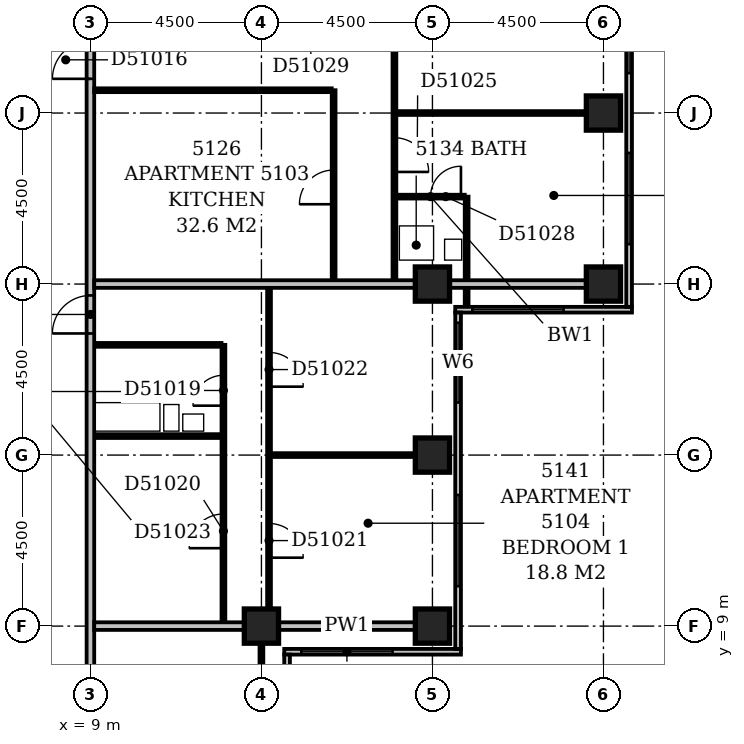
"""IFC4 building model, lengths in metres.
Left out: names, types, materials, properties, quantities, classifications, styles, units other than length and angle.
Written with IfcOpenShell. Run it as: python <this file> out.ifc"""

import sys

from ifc_helpers import new_model, si_unit, direction, frame, frame_2d, origin, origin_2d, place, context, subcontext, project, spatial, rectangle, extrude, element, fill, save


model = new_model("IFC4")
c1 = context("Model", 3, precision=1e-05, world=origin(), true_north=direction((0.0, 1.0)))
c2 = subcontext(c1, "Body", "Model", "MODEL_VIEW")
j1 = project(units=[si_unit("LENGTHUNIT", "METRE"), si_unit("PLANEANGLEUNIT", "RADIAN")], contexts=[c1])
p1 = place(None, origin())
s1 = spatial("IfcSite", under=j1, at=p1, CompositionType="ELEMENT")
p2 = place(p1, origin())
s2 = spatial("IfcBuilding", under=s1, at=p2, CompositionType="ELEMENT")
p3 = place(p2, frame((0.0, 0.0, 200.6)))
s3 = spatial("IfcBuildingStorey", under=s2, at=p3, CompositionType="ELEMENT", Elevation=200.6)
for number, where, z_axis, x_axis in (
    (1, (13.5, 9.0, -0.3), (0.0, 0.0, 1.0), (1.0, 0.0, 0.0)),
    (2, (18.0, 9.0, -0.3), (0.0, 0.0, 1.0), (1.0, 0.0, 0.0)),
    (3, (18.0, 13.5, -0.3), (0.0, 0.0, 1.0), (1.0, 0.0, 0.0)),
    (4, (18.0, 18.0, -0.3), (0.0, 0.0, 1.0), (1.0, 0.0, 0.0)),
    (5, (22.5, 18.0, -0.3), (0.0, 0.0, 1.0), (1.0, 0.0, 0.0)),
    (6, (22.5, 22.5, -0.3), (0.0, 0.0, 1.0), (1.0, 0.0, 0.0)),
):
    element("IfcColumn", number, at=place(p3, frame(where, z_axis=z_axis, x_axis=x_axis)), inside=s3, PredefinedType="COLUMN", context=c2, shape_type="SweptSolid", body=[
        extrude(rectangle(XDim=0.9, YDim=0.9, at=origin_2d()), origin(), (0.0, 0.0, 1.0), 3.6),
    ])
p4 = place(p3, frame((14.175, 3.9, 0.0), z_axis=(0.0, 0.0, 1.0), x_axis=(0.0, 1.0, 0.0)))
e7 = element("IfcWall", 7, at=p4, inside=s3, PredefinedType="STANDARD", context=c2, shape_type="SweptSolid", body=[
    extrude(rectangle(XDim=4.35, YDim=0.15, at=frame_2d((2.175, 0.0))), origin(), (0.0, 0.0, 1.0), 2.7),
])
p5 = place(p4, frame((1.65, 0.0, 0.6)))
e8 = element("IfcOpeningElement", 8, at=p5, cuts=e7, PredefinedType="OPENING", context=c2, shape_type="SweptSolid", body=[
    extrude(rectangle(XDim=2.4, YDim=1.8, at=frame_2d((1.2, 0.9))), frame((0.0, 0.087, 0.0), z_axis=(0.0, -1.0, 0.0), x_axis=(1.0, 0.0, 0.0)), (0.0, 0.0, 1.0), 0.174),
])
p6 = place(p3, frame((14.1, 8.325, 0.0), z_axis=(0.0, 0.0, 1.0), x_axis=(1.0, 0.0, 0.0)))
e9 = element("IfcWall", 9, at=p6, inside=s3, PredefinedType="STANDARD", context=c2, shape_type="SweptSolid", body=[
    extrude(rectangle(XDim=4.65, YDim=0.15, at=frame_2d((2.325, 0.0))), origin(), (0.0, 0.0, 1.0), 2.7),
])
p7 = place(p6, frame((0.45, 0.0, 0.6)))
e10 = element("IfcOpeningElement", 10, at=p7, cuts=e9, PredefinedType="OPENING", context=c2, shape_type="SweptSolid", body=[
    extrude(rectangle(XDim=2.4, YDim=1.8, at=frame_2d((1.2, 0.9))), frame((0.0, 0.087, 0.0), z_axis=(0.0, -1.0, 0.0), x_axis=(1.0, 0.0, 0.0)), (0.0, 0.0, 1.0), 0.174),
])
p8 = place(p3, frame((18.675, 8.4, 0.0), z_axis=(0.0, 0.0, 1.0), x_axis=(0.0, 1.0, 0.0)))
e11 = element("IfcWall", 11, at=p8, inside=s3, PredefinedType="STANDARD", context=c2, shape_type="SweptSolid", body=[
    extrude(rectangle(XDim=8.85, YDim=0.15, at=frame_2d((4.425, 0.0))), origin(), (0.0, 0.0, 1.0), 2.7),
])
p9 = place(p8, frame((1.65, 0.0, 0.6)))
e12 = element("IfcOpeningElement", 12, at=p9, cuts=e11, PredefinedType="OPENING", context=c2, shape_type="SweptSolid", body=[
    extrude(rectangle(XDim=2.4, YDim=1.8, at=frame_2d((1.2, 0.9))), frame((0.0, 0.087, 0.0), z_axis=(0.0, -1.0, 0.0), x_axis=(1.0, 0.0, 0.0)), (0.0, 0.0, 1.0), 0.174),
])
p10 = place(p8, frame((6.483, 0.0, 0.6)))
e13 = element("IfcOpeningElement", 13, at=p10, cuts=e11, PredefinedType="OPENING", context=c2, shape_type="SweptSolid", body=[
    extrude(rectangle(XDim=2.1, YDim=1.8, at=frame_2d((1.05, 0.9))), frame((0.0, 0.087, 0.0), z_axis=(0.0, -1.0, 0.0), x_axis=(1.0, 0.0, 0.0)), (0.0, 0.0, 1.0), 0.174),
])
p11 = place(p3, frame((18.6, 17.325, 0.0), z_axis=(0.0, 0.0, 1.0), x_axis=(1.0, 0.0, 0.0)))
e14 = element("IfcWall", 14, at=p11, inside=s3, PredefinedType="STANDARD", context=c2, shape_type="SweptSolid", body=[
    extrude(rectangle(XDim=4.65, YDim=0.15, at=frame_2d((2.325, 0.0))), origin(), (0.0, 0.0, 1.0), 2.7),
])
p12 = place(p11, frame((0.45, 0.0, 0.6)))
e15 = element("IfcOpeningElement", 15, at=p12, cuts=e14, PredefinedType="OPENING", context=c2, shape_type="SweptSolid", body=[
    extrude(rectangle(XDim=2.4, YDim=1.8, at=frame_2d((1.2, 0.9))), frame((0.0, 0.087, 0.0), z_axis=(0.0, -1.0, 0.0), x_axis=(1.0, 0.0, 0.0)), (0.0, 0.0, 1.0), 0.174),
])
p13 = place(p3, frame((23.175, 17.4, 0.0), z_axis=(0.0, 0.0, 1.0), x_axis=(0.0, 1.0, 0.0)))
e16 = element("IfcWall", 16, at=p13, inside=s3, PredefinedType="STANDARD", context=c2, shape_type="SweptSolid", body=[
    extrude(rectangle(XDim=17.85, YDim=0.15, at=frame_2d((8.925, 0.0))), origin(), (0.0, 0.0, 1.0), 2.7),
])
p14 = place(p13, frame((1.65, 0.0, 0.6)))
e17 = element("IfcOpeningElement", 17, at=p14, cuts=e16, PredefinedType="OPENING", context=c2, shape_type="SweptSolid", body=[
    extrude(rectangle(XDim=2.4, YDim=1.8, at=frame_2d((1.2, 0.9))), frame((0.0, 0.087, 0.0), z_axis=(0.0, -1.0, 0.0), x_axis=(1.0, 0.0, 0.0)), (0.0, 0.0, 1.0), 0.174),
])
p15 = place(p13, frame((6.15, 0.0, 0.6)))
e18 = element("IfcOpeningElement", 18, at=p15, cuts=e16, PredefinedType="OPENING", context=c2, shape_type="SweptSolid", body=[
    extrude(rectangle(XDim=2.4, YDim=1.8, at=frame_2d((1.2, 0.9))), frame((0.0, 0.087, 0.0), z_axis=(0.0, -1.0, 0.0), x_axis=(1.0, 0.0, 0.0)), (0.0, 0.0, 1.0), 0.174),
])
p16 = place(p13, frame((10.252, 0.0, 0.6)))
e19 = element("IfcOpeningElement", 19, at=p16, cuts=e16, PredefinedType="OPENING", context=c2, shape_type="SweptSolid", body=[
    extrude(rectangle(XDim=0.6, YDim=1.8, at=frame_2d((0.3, 0.9))), frame((0.0, 0.087, 0.0), z_axis=(0.0, -1.0, 0.0), x_axis=(1.0, 0.0, 0.0)), (0.0, 0.0, 1.0), 0.174),
])
p17 = place(p13, frame((12.756, 0.0, 0.6)))
e20 = element("IfcOpeningElement", 20, at=p17, cuts=e16, PredefinedType="OPENING", context=c2, shape_type="SweptSolid", body=[
    extrude(rectangle(XDim=0.6, YDim=1.8, at=frame_2d((0.3, 0.9))), frame((0.0, 0.087, 0.0), z_axis=(0.0, -1.0, 0.0), x_axis=(1.0, 0.0, 0.0)), (0.0, 0.0, 1.0), 0.174),
])
p18 = place(p13, frame((15.15, 0.0, 0.6)))
e21 = element("IfcOpeningElement", 21, at=p18, cuts=e16, PredefinedType="OPENING", context=c2, shape_type="SweptSolid", body=[
    extrude(rectangle(XDim=2.4, YDim=1.8, at=frame_2d((1.2, 0.9))), frame((0.0, 0.087, 0.0), z_axis=(0.0, -1.0, 0.0), x_axis=(1.0, 0.0, 0.0)), (0.0, 0.0, 1.0), 0.174),
])
p19 = place(p3, frame((13.5, 4.95, 0.0), z_axis=(0.0, 0.0, 1.0), x_axis=(0.0, 1.0, 0.0)))
e22 = element("IfcWall", 22, at=p19, inside=s3, PredefinedType="PARTITIONING", context=c2, shape_type="SweptSolid", body=[
    extrude(rectangle(XDim=3.6, YDim=0.1, at=frame_2d((1.8, 0.0))), origin(), (0.0, 0.0, 1.0), 2.7),
])
p20 = place(p3, frame((9.0, 5.0, 0.0), z_axis=(0.0, 0.0, 1.0), x_axis=(0.0, 1.0, 0.0)))
e23 = element("IfcWall", 23, at=p20, inside=s3, PredefinedType="PARTITIONING", context=c2, shape_type="SweptSolid", body=[
    extrude(rectangle(XDim=31.0, YDim=0.2, at=frame_2d((15.5, 0.0))), origin(), (0.0, 0.0, 1.0), 3.3),
])
p21 = place(p20, frame((18.4, 0.0, 0.0)))
e24 = element("IfcOpeningElement", 24, at=p21, cuts=e23, PredefinedType="OPENING", context=c2, shape_type="SweptSolid", body=[
    extrude(rectangle(XDim=1.0, YDim=2.1, at=frame_2d((0.5, 1.05))), frame((0.0, 0.112, 0.0), z_axis=(0.0, -1.0, 0.0), x_axis=(1.0, 0.0, 0.0)), (0.0, 0.0, 1.0), 0.224),
])
p22 = place(p20, frame((11.7, 0.0, 0.0)))
e25 = element("IfcOpeningElement", 25, at=p22, cuts=e23, PredefinedType="OPENING", context=c2, shape_type="SweptSolid", body=[
    extrude(rectangle(XDim=1.0, YDim=2.1, at=frame_2d((0.5, 1.05))), frame((0.0, 0.112, 0.0), z_axis=(0.0, -1.0, 0.0), x_axis=(1.0, 0.0, 0.0)), (0.0, 0.0, 1.0), 0.224),
])
p23 = place(p20, frame((1.5, 0.0, 0.0)))
e26 = element("IfcOpeningElement", 26, at=p23, cuts=e23, PredefinedType="OPENING", context=c2, shape_type="SweptSolid", body=[
    extrude(rectangle(XDim=0.9, YDim=2.1, at=frame_2d((0.45, 1.05))), frame((0.0, 0.112, 0.0), z_axis=(0.0, -1.0, 0.0), x_axis=(1.0, 0.0, 0.0)), (0.0, 0.0, 1.0), 0.224),
])
p24 = place(p3, frame((9.1, 9.0, 0.0), z_axis=(0.0, 0.0, 1.0), x_axis=(1.0, 0.0, 0.0)))
e27 = element("IfcWall", 27, at=p24, inside=s3, PredefinedType="PARTITIONING", context=c2, shape_type="SweptSolid", body=[
    extrude(rectangle(XDim=3.95, YDim=0.2, at=frame_2d((1.975, 0.0))), origin(), (0.0, 0.0, 1.0), 3.3),
])
p25 = place(p3, frame((13.95, 9.0, 0.0), z_axis=(0.0, 0.0, 1.0), x_axis=(1.0, 0.0, 0.0)))
e28 = element("IfcWall", 28, at=p25, inside=s3, PredefinedType="PARTITIONING", context=c2, shape_type="SweptSolid", body=[
    extrude(rectangle(XDim=3.6, YDim=0.2, at=frame_2d((1.8, 0.0))), origin(), (0.0, 0.0, 1.0), 2.7),
])
p26 = place(p3, frame((12.5, 9.1, 0.0), z_axis=(0.0, 0.0, 1.0), x_axis=(0.0, 1.0, 0.0)))
e29 = element("IfcWall", 29, at=p26, inside=s3, PredefinedType="PARTITIONING", context=c2, shape_type="SweptSolid", body=[
    extrude(rectangle(XDim=7.3, YDim=0.1, at=frame_2d((3.65, 0.0))), origin(), (0.0, 0.0, 1.0), 3.3),
])
p27 = place(p26, frame((5.7, 0.0, 0.0)))
e30 = element("IfcOpeningElement", 30, at=p27, cuts=e29, PredefinedType="OPENING", context=c2, shape_type="SweptSolid", body=[
    extrude(rectangle(XDim=0.8, YDim=2.1, at=frame_2d((0.4, 1.05))), frame((0.0, 0.062, 0.0), z_axis=(0.0, -1.0, 0.0), x_axis=(1.0, 0.0, 0.0)), (0.0, 0.0, 1.0), 0.124),
])
p28 = place(p26, frame((1.95, 0.0, 0.0)))
e31 = element("IfcOpeningElement", 31, at=p28, cuts=e29, PredefinedType="OPENING", context=c2, shape_type="SweptSolid", body=[
    extrude(rectangle(XDim=0.9, YDim=2.1, at=frame_2d((0.45, 1.05))), frame((0.0, 0.062, 0.0), z_axis=(0.0, -1.0, 0.0), x_axis=(1.0, 0.0, 0.0)), (0.0, 0.0, 1.0), 0.124),
])
p29 = place(p3, frame((13.7, 9.45, 0.0), z_axis=(0.0, 0.0, 1.0), x_axis=(0.0, 1.0, 0.0)))
e32 = element("IfcWall", 32, at=p29, inside=s3, PredefinedType="PARTITIONING", context=c2, shape_type="SweptSolid", body=[
    extrude(rectangle(XDim=8.45, YDim=0.1, at=frame_2d((4.225, 0.0))), origin(), (0.0, 0.0, 1.0), 3.3),
])
p30 = place(p29, frame((1.35, 0.0, 0.0)))
e33 = element("IfcOpeningElement", 33, at=p30, cuts=e32, PredefinedType="OPENING", context=c2, shape_type="SweptSolid", body=[
    extrude(rectangle(XDim=0.9, YDim=2.1, at=frame_2d((0.45, 1.05))), frame((0.0, 0.062, 0.0), z_axis=(0.0, -1.0, 0.0), x_axis=(1.0, 0.0, 0.0)), (0.0, 0.0, 1.0), 0.124),
])
p31 = place(p29, frame((5.85, 0.0, 0.0)))
e34 = element("IfcOpeningElement", 34, at=p31, cuts=e32, PredefinedType="OPENING", context=c2, shape_type="SweptSolid", body=[
    extrude(rectangle(XDim=0.9, YDim=2.1, at=frame_2d((0.45, 1.05))), frame((0.0, 0.062, 0.0), z_axis=(0.0, -1.0, 0.0), x_axis=(1.0, 0.0, 0.0)), (0.0, 0.0, 1.0), 0.124),
])
p32 = place(p3, frame((13.75, 13.5, 0.0), z_axis=(0.0, 0.0, 1.0), x_axis=(1.0, 0.0, 0.0)))
e35 = element("IfcWall", 35, at=p32, inside=s3, PredefinedType="PARTITIONING", context=c2, shape_type="SweptSolid", body=[
    extrude(rectangle(XDim=3.8, YDim=0.1, at=frame_2d((1.9, 0.0))), origin(), (0.0, 0.0, 1.0), 3.3),
])
for number, where, z_axis, x_axis in (
    (36, (9.1, 14.0, 0.0), (0.0, 0.0, 1.0), (1.0, 0.0, 0.0)),
    (37, (9.1, 16.4, 0.0), (0.0, 0.0, 1.0), (1.0, 0.0, 0.0)),
):
    element("IfcWall", number, at=place(p3, frame(where, z_axis=z_axis, x_axis=x_axis)), inside=s3, PredefinedType="PLUMBINGWALL", context=c2, shape_type="SweptSolid", body=[
        extrude(rectangle(XDim=3.35, YDim=0.1, at=frame_2d((1.675, 0.0))), origin(), (0.0, 0.0, 1.0), 3.3),
    ])
p33 = place(p3, frame((18.9, 17.4, 0.0), z_axis=(0.0, 0.0, 1.0), x_axis=(0.0, 1.0, 0.0)))
e38 = element("IfcWall", 38, at=p33, inside=s3, PredefinedType="PLUMBINGWALL", context=c2, shape_type="SweptSolid", body=[
    extrude(rectangle(XDim=2.9, YDim=0.1, at=frame_2d((1.45, 0.0))), origin(), (0.0, 0.0, 1.0), 3.3),
])
p34 = place(p3, frame((9.1, 18.0, 0.0), z_axis=(0.0, 0.0, 1.0), x_axis=(1.0, 0.0, 0.0)))
e39 = element("IfcWall", 39, at=p34, inside=s3, PredefinedType="PARTITIONING", context=c2, shape_type="SweptSolid", body=[
    extrude(rectangle(XDim=8.45, YDim=0.2, at=frame_2d((4.225, 0.0))), origin(), (0.0, 0.0, 1.0), 2.6),
])
p35 = place(p3, frame((18.45, 18.0, 0.0), z_axis=(0.0, 0.0, 1.0), x_axis=(1.0, 0.0, 0.0)))
e40 = element("IfcWall", 40, at=p35, inside=s3, PredefinedType="PARTITIONING", context=c2, shape_type="SweptSolid", body=[
    extrude(rectangle(XDim=3.6, YDim=0.2, at=frame_2d((1.8, 0.0))), origin(), (0.0, 0.0, 1.0), 2.7),
])
p36 = place(p3, frame((15.4, 18.1, 0.0), z_axis=(0.0, 0.0, 1.0), x_axis=(0.0, 1.0, 0.0)))
e41 = element("IfcWall", 41, at=p36, inside=s3, PredefinedType="PARTITIONING", context=c2, shape_type="SweptSolid", body=[
    extrude(rectangle(XDim=5.0, YDim=0.1, at=frame_2d((2.5, 0.0))), origin(), (0.0, 0.0, 1.0), 3.3),
])
p37 = place(p36, frame((2.0, 0.0, 0.0)))
e42 = element("IfcOpeningElement", 42, at=p37, cuts=e41, PredefinedType="OPENING", context=c2, shape_type="SweptSolid", body=[
    extrude(rectangle(XDim=0.9, YDim=2.1, at=frame_2d((0.45, 1.05))), frame((0.0, 0.062, 0.0), z_axis=(0.0, -1.0, 0.0), x_axis=(1.0, 0.0, 0.0)), (0.0, 0.0, 1.0), 0.124),
])
p38 = place(p3, frame((17.0, 18.1, 0.0), z_axis=(0.0, 0.0, 1.0), x_axis=(0.0, 1.0, 0.0)))
e43 = element("IfcWall", 43, at=p38, inside=s3, PredefinedType="PARTITIONING", context=c2, shape_type="SweptSolid", body=[
    extrude(rectangle(XDim=17.8, YDim=0.1, at=frame_2d((8.9, 0.0))), origin(), (0.0, 0.0, 1.0), 3.3),
])
p39 = place(p38, frame((2.85, 0.0, 0.0)))
e44 = element("IfcOpeningElement", 44, at=p39, cuts=e43, PredefinedType="OPENING", context=c2, shape_type="SweptSolid", body=[
    extrude(rectangle(XDim=0.9, YDim=2.1, at=frame_2d((0.45, 1.05))), frame((0.0, 0.062, 0.0), z_axis=(0.0, -1.0, 0.0), x_axis=(1.0, 0.0, 0.0)), (0.0, 0.0, 1.0), 0.124),
])
p40 = place(p38, frame((8.4, 0.0, 0.0)))
e45 = element("IfcOpeningElement", 45, at=p40, cuts=e43, PredefinedType="OPENING", context=c2, shape_type="SweptSolid", body=[
    extrude(rectangle(XDim=0.9, YDim=2.1, at=frame_2d((0.45, 1.05))), frame((0.0, 0.062, 0.0), z_axis=(0.0, -1.0, 0.0), x_axis=(1.0, 0.0, 0.0)), (0.0, 0.0, 1.0), 0.124),
])
p41 = place(p38, frame((14.05, 0.0, 0.0)))
e46 = element("IfcOpeningElement", 46, at=p41, cuts=e43, PredefinedType="OPENING", context=c2, shape_type="SweptSolid", body=[
    extrude(rectangle(XDim=0.9, YDim=2.1, at=frame_2d((0.45, 1.05))), frame((0.0, 0.062, 0.0), z_axis=(0.0, -1.0, 0.0), x_axis=(1.0, 0.0, 0.0)), (0.0, 0.0, 1.0), 0.124),
])
p42 = place(p3, frame((17.05, 20.3, 0.0), z_axis=(0.0, 0.0, 1.0), x_axis=(1.0, 0.0, 0.0)))
e47 = element("IfcWall", 47, at=p42, inside=s3, PredefinedType="PLUMBINGWALL", context=c2, shape_type="SweptSolid", body=[
    extrude(rectangle(XDim=1.8, YDim=0.1, at=frame_2d((0.9, 0.0))), origin(), (0.0, 0.0, 1.0), 3.3),
])
p43 = place(p42, frame((0.9, 0.0, 0.0)))
e48 = element("IfcOpeningElement", 48, at=p43, cuts=e47, PredefinedType="OPENING", context=c2, shape_type="SweptSolid", body=[
    extrude(rectangle(XDim=0.8, YDim=2.1, at=frame_2d((0.4, 1.05))), frame((0.0, 0.062, 0.0), z_axis=(0.0, -1.0, 0.0), x_axis=(1.0, 0.0, 0.0)), (0.0, 0.0, 1.0), 0.124),
])
p44 = place(p3, frame((17.05, 22.5, 0.0), z_axis=(0.0, 0.0, 1.0), x_axis=(1.0, 0.0, 0.0)))
e49 = element("IfcWall", 49, at=p44, inside=s3, PredefinedType="PARTITIONING", context=c2, shape_type="SweptSolid", body=[
    extrude(rectangle(XDim=5.0, YDim=0.1, at=frame_2d((2.5, 0.0))), origin(), (0.0, 0.0, 1.0), 3.3),
])
p45 = place(p3, frame((9.1, 23.1, 0.0), z_axis=(0.0, 0.0, 1.0), x_axis=(1.0, 0.0, 0.0)))
e50 = element("IfcWall", 50, at=p45, inside=s3, PredefinedType="PARTITIONING", context=c2, shape_type="SweptSolid", body=[
    extrude(rectangle(XDim=6.25, YDim=0.1, at=frame_2d((3.125, 0.0))), origin(), (0.0, 0.0, 1.0), 3.3),
])
p46 = place(p7, origin())
e51 = element("IfcWindow", 51, at=p46, inside=s3, PartitioningType="SINGLE_PANEL", PredefinedType="WINDOW", context=c2, shape_type="SweptSolid", body=[
    extrude(rectangle(XDim=2.4, YDim=1.8, at=frame_2d((1.2, 0.9))), frame((0.0, 0.03, 0.0), z_axis=(0.0, -1.0, 0.0), x_axis=(1.0, 0.0, 0.0)), (0.0, 0.0, 1.0), 0.06),
])
fill(e10, e51)
p47 = place(p9, origin())
e52 = element("IfcWindow", 52, at=p47, inside=s3, PartitioningType="SINGLE_PANEL", PredefinedType="WINDOW", context=c2, shape_type="SweptSolid", body=[
    extrude(rectangle(XDim=2.4, YDim=1.8, at=frame_2d((1.2, 0.9))), frame((0.0, 0.03, 0.0), z_axis=(0.0, -1.0, 0.0), x_axis=(1.0, 0.0, 0.0)), (0.0, 0.0, 1.0), 0.06),
])
fill(e12, e52)
p48 = place(p10, origin())
e53 = element("IfcWindow", 53, at=p48, inside=s3, PartitioningType="SINGLE_PANEL", PredefinedType="WINDOW", context=c2, shape_type="SweptSolid", body=[
    extrude(rectangle(XDim=2.1, YDim=1.8, at=frame_2d((1.05, 0.9))), frame((0.0, 0.03, 0.0), z_axis=(0.0, -1.0, 0.0), x_axis=(1.0, 0.0, 0.0)), (0.0, 0.0, 1.0), 0.06),
])
fill(e13, e53)
p49 = place(p12, origin())
e54 = element("IfcWindow", 54, at=p49, inside=s3, PartitioningType="SINGLE_PANEL", PredefinedType="WINDOW", context=c2, shape_type="SweptSolid", body=[
    extrude(rectangle(XDim=2.4, YDim=1.8, at=frame_2d((1.2, 0.9))), frame((0.0, 0.03, 0.0), z_axis=(0.0, -1.0, 0.0), x_axis=(1.0, 0.0, 0.0)), (0.0, 0.0, 1.0), 0.06),
])
fill(e15, e54)
p50 = place(p14, origin())
e55 = element("IfcWindow", 55, at=p50, inside=s3, PartitioningType="SINGLE_PANEL", PredefinedType="WINDOW", context=c2, shape_type="SweptSolid", body=[
    extrude(rectangle(XDim=2.4, YDim=1.8, at=frame_2d((1.2, 0.9))), frame((0.0, 0.03, 0.0), z_axis=(0.0, -1.0, 0.0), x_axis=(1.0, 0.0, 0.0)), (0.0, 0.0, 1.0), 0.06),
])
fill(e17, e55)
p51 = place(p15, origin())
e56 = element("IfcWindow", 56, at=p51, inside=s3, PartitioningType="SINGLE_PANEL", PredefinedType="WINDOW", context=c2, shape_type="SweptSolid", body=[
    extrude(rectangle(XDim=2.4, YDim=1.8, at=frame_2d((1.2, 0.9))), frame((0.0, 0.03, 0.0), z_axis=(0.0, -1.0, 0.0), x_axis=(1.0, 0.0, 0.0)), (0.0, 0.0, 1.0), 0.06),
])
fill(e18, e56)
p52 = place(p21, origin())
e57 = element("IfcDoor", 57, at=p52, inside=s3, OperationType="SINGLE_SWING_LEFT", PredefinedType="DOOR", context=c2, shape_type="SweptSolid", body=[
    extrude(rectangle(XDim=1.0, YDim=2.1, at=frame_2d((0.5, 1.05))), frame((0.0, 0.025, 0.0), z_axis=(0.0, -1.0, 0.0), x_axis=(1.0, 0.0, 0.0)), (0.0, 0.0, 1.0), 0.05),
])
fill(e24, e57)
p53 = place(p22, origin())
e58 = element("IfcDoor", 58, at=p53, inside=s3, OperationType="SINGLE_SWING_LEFT", PredefinedType="DOOR", context=c2, shape_type="SweptSolid", body=[
    extrude(rectangle(XDim=1.0, YDim=2.1, at=frame_2d((0.5, 1.05))), frame((0.0, 0.025, 0.0), z_axis=(0.0, -1.0, 0.0), x_axis=(1.0, 0.0, 0.0)), (0.0, 0.0, 1.0), 0.05),
])
fill(e25, e58)
p54 = place(p27, origin())
e59 = element("IfcDoor", 59, at=p54, inside=s3, OperationType="SINGLE_SWING_LEFT", PredefinedType="DOOR", context=c2, shape_type="SweptSolid", body=[
    extrude(rectangle(XDim=0.8, YDim=2.1, at=frame_2d((0.4, 1.05))), frame((0.0, 0.025, 0.0), z_axis=(0.0, -1.0, 0.0), x_axis=(1.0, 0.0, 0.0)), (0.0, 0.0, 1.0), 0.05),
])
fill(e30, e59)
p55 = place(p28, origin())
e60 = element("IfcDoor", 60, at=p55, inside=s3, OperationType="SINGLE_SWING_LEFT", PredefinedType="DOOR", context=c2, shape_type="SweptSolid", body=[
    extrude(rectangle(XDim=0.9, YDim=2.1, at=frame_2d((0.45, 1.05))), frame((0.0, 0.025, 0.0), z_axis=(0.0, -1.0, 0.0), x_axis=(1.0, 0.0, 0.0)), (0.0, 0.0, 1.0), 0.05),
])
fill(e31, e60)
p56 = place(p30, frame((0.9, 0.0, 0.0), z_axis=(0.0, 0.0, 1.0), x_axis=(-1.0, 0.0, 0.0)))
e61 = element("IfcDoor", 61, at=p56, inside=s3, OperationType="SINGLE_SWING_RIGHT", PredefinedType="DOOR", context=c2, shape_type="SweptSolid", body=[
    extrude(rectangle(XDim=0.9, YDim=2.1, at=frame_2d((0.45, 1.05))), frame((0.0, 0.025, 0.0), z_axis=(0.0, -1.0, 0.0), x_axis=(1.0, 0.0, 0.0)), (0.0, 0.0, 1.0), 0.05),
])
fill(e33, e61)
p57 = place(p31, frame((0.9, 0.0, 0.0), z_axis=(0.0, 0.0, 1.0), x_axis=(-1.0, 0.0, 0.0)))
e62 = element("IfcDoor", 62, at=p57, inside=s3, OperationType="SINGLE_SWING_RIGHT", PredefinedType="DOOR", context=c2, shape_type="SweptSolid", body=[
    extrude(rectangle(XDim=0.9, YDim=2.1, at=frame_2d((0.45, 1.05))), frame((0.0, 0.025, 0.0), z_axis=(0.0, -1.0, 0.0), x_axis=(1.0, 0.0, 0.0)), (0.0, 0.0, 1.0), 0.05),
])
fill(e34, e62)
p58 = place(p37, origin())
e63 = element("IfcDoor", 63, at=p58, inside=s3, OperationType="SINGLE_SWING_LEFT", PredefinedType="DOOR", context=c2, shape_type="SweptSolid", body=[
    extrude(rectangle(XDim=0.9, YDim=2.1, at=frame_2d((0.45, 1.05))), frame((0.0, 0.025, 0.0), z_axis=(0.0, -1.0, 0.0), x_axis=(1.0, 0.0, 0.0)), (0.0, 0.0, 1.0), 0.05),
])
fill(e42, e63)
p59 = place(p39, frame((0.9, 0.0, 0.0), z_axis=(0.0, 0.0, 1.0), x_axis=(-1.0, 0.0, 0.0)))
e64 = element("IfcDoor", 64, at=p59, inside=s3, OperationType="SINGLE_SWING_RIGHT", PredefinedType="DOOR", context=c2, shape_type="SweptSolid", body=[
    extrude(rectangle(XDim=0.9, YDim=2.1, at=frame_2d((0.45, 1.05))), frame((0.0, 0.025, 0.0), z_axis=(0.0, -1.0, 0.0), x_axis=(1.0, 0.0, 0.0)), (0.0, 0.0, 1.0), 0.05),
])
fill(e44, e64)
p60 = place(p43, frame((0.8, 0.0, 0.0), z_axis=(0.0, 0.0, 1.0), x_axis=(-1.0, 0.0, 0.0)))
e65 = element("IfcDoor", 65, at=p60, inside=s3, OperationType="SINGLE_SWING_LEFT", PredefinedType="DOOR", context=c2, shape_type="SweptSolid", body=[
    extrude(rectangle(XDim=0.8, YDim=2.1, at=frame_2d((0.4, 1.05))), frame((0.0, 0.025, 0.0), z_axis=(0.0, -1.0, 0.0), x_axis=(1.0, 0.0, 0.0)), (0.0, 0.0, 1.0), 0.05),
])
fill(e48, e65)
save(model, sys.argv[1])
